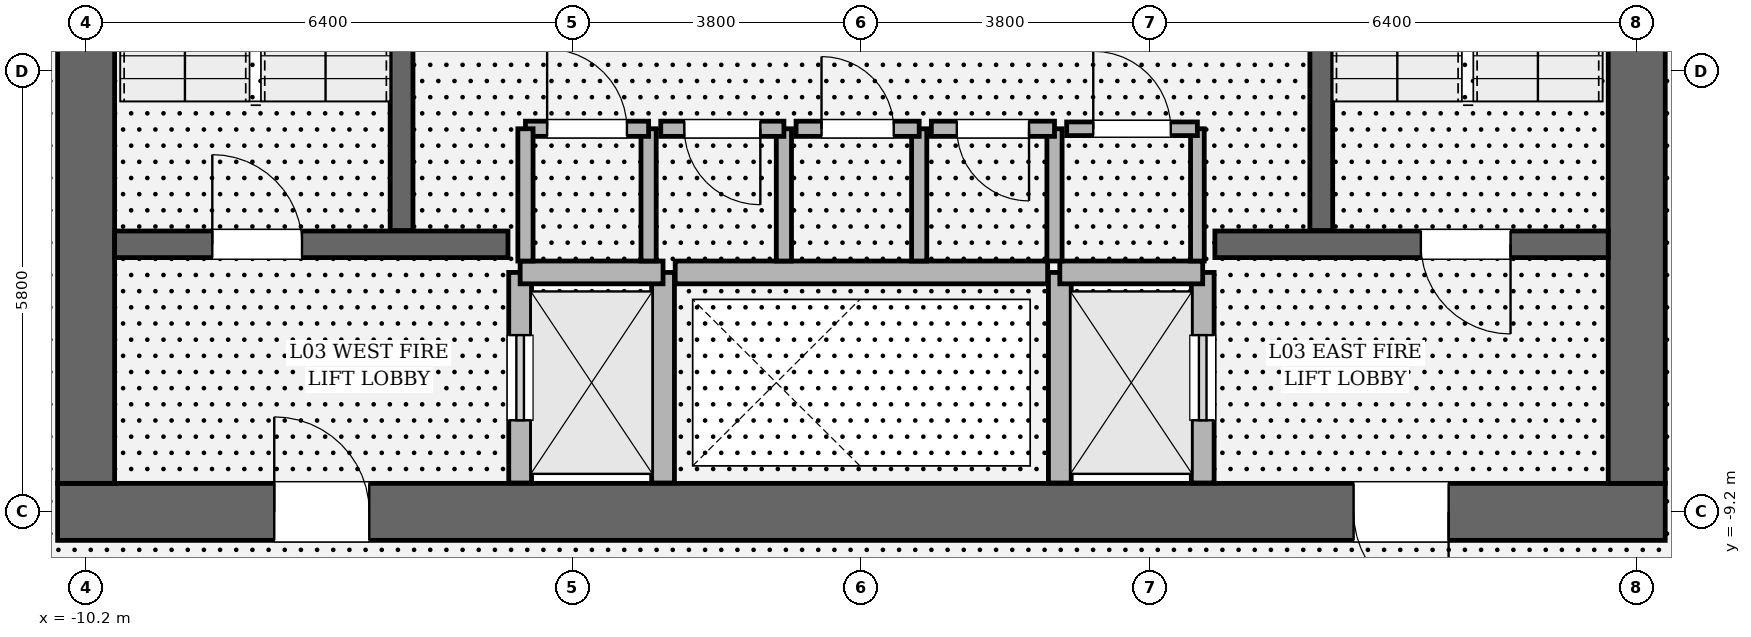
"""IFC4 building model, lengths in metres.
Left out: names, types, materials, properties, quantities, classifications, styles, units other than length and angle.
Written with IfcOpenShell. Run it as: python <this file> out.ifc"""

import sys

from ifc_helpers import new_model, si_unit, direction, frame, frame_2d, origin, place, context, subcontext, project, spatial, rectangle, extrude, element, fill, save


model = new_model("IFC4")
c1 = context("Model", 3, precision=1e-05, world=origin(), true_north=direction((0.0, 1.0)))
c2 = subcontext(c1, "Body", "Model", "MODEL_VIEW")
j1 = project(units=[si_unit("LENGTHUNIT", "METRE"), si_unit("PLANEANGLEUNIT", "RADIAN")], contexts=[c1])
p1 = place(None, origin())
s1 = spatial("IfcSite", under=j1, at=p1, CompositionType="ELEMENT")
p2 = place(p1, origin())
s2 = spatial("IfcBuilding", under=s1, at=p2, CompositionType="ELEMENT")
p3 = place(p2, frame((0.0, 0.0, 16.8)))
s3 = spatial("IfcBuildingStorey", under=s2, at=p3, CompositionType="ELEMENT", Elevation=16.8)
p4 = place(p3, frame((10.575, -9.2, 0.0), z_axis=(0.0, 0.0, 1.0), x_axis=(-1.0, 0.0, 0.0)))
e1 = element("IfcWall", 1, at=p4, inside=s3, PredefinedType="SHEAR", context=c2, shape_type="SweptSolid", body=[
    extrude(rectangle(XDim=21.15, YDim=0.75, at=frame_2d((10.575, 0.0))), origin(), (0.0, 0.0, 1.0), 5.4),
])
p5 = place(p4, frame((2.85, 0.0, 0.0)))
e2 = element("IfcOpeningElement", 2, at=p5, cuts=e1, PredefinedType="OPENING", context=c2, shape_type="SweptSolid", body=[
    extrude(rectangle(XDim=1.25, YDim=2.25, at=frame_2d((0.625, 1.125))), frame((0.0, 0.385, 0.0), z_axis=(0.0, -1.0, 0.0), x_axis=(1.0, 0.0, 0.0)), (0.0, 0.0, 1.0), 0.77),
])
p6 = place(p4, frame((17.05, 0.0, 0.0)))
e3 = element("IfcOpeningElement", 3, at=p6, cuts=e1, PredefinedType="OPENING", context=c2, shape_type="SweptSolid", body=[
    extrude(rectangle(XDim=1.25, YDim=2.25, at=frame_2d((0.625, 1.125))), frame((0.0, 0.385, 0.0), z_axis=(0.0, -1.0, 0.0), x_axis=(1.0, 0.0, 0.0)), (0.0, 0.0, 1.0), 0.77),
])
p7 = place(p3, frame((-10.2, -8.825, 0.0), z_axis=(0.0, 0.0, 1.0), x_axis=(0.0, 1.0, 0.0)))
e4 = element("IfcWall", 4, at=p7, inside=s3, PredefinedType="SHEAR", context=c2, shape_type="SweptSolid", body=[
    extrude(rectangle(XDim=17.65, YDim=0.75, at=frame_2d((8.825, 0.0))), origin(), (0.0, 0.0, 1.0), 5.4),
])
p8 = place(p7, frame((12.615, 0.0, 0.0)))
e5 = element("IfcOpeningElement", 5, at=p8, cuts=e4, PredefinedType="OPENING", context=c2, shape_type="SweptSolid", body=[
    extrude(rectangle(XDim=1.18, YDim=2.2, at=frame_2d((0.59, 1.1))), frame((0.0, 0.385, 0.0), z_axis=(0.0, -1.0, 0.0), x_axis=(1.0, 0.0, 0.0)), (0.0, 0.0, 1.0), 0.77),
])
p9 = place(p3, frame((10.2, 8.825, 0.0), z_axis=(0.0, 0.0, 1.0), x_axis=(0.0, -1.0, 0.0)))
e6 = element("IfcWall", 6, at=p9, inside=s3, PredefinedType="SHEAR", context=c2, shape_type="SweptSolid", body=[
    extrude(rectangle(XDim=17.65, YDim=0.75, at=frame_2d((8.825, 0.0))), origin(), (0.0, 0.0, 1.0), 5.4),
])
p10 = place(p9, frame((3.855, 0.0, 0.0)))
e7 = element("IfcOpeningElement", 7, at=p10, cuts=e6, PredefinedType="OPENING", context=c2, shape_type="SweptSolid", body=[
    extrude(rectangle(XDim=1.18, YDim=2.2, at=frame_2d((0.59, 1.1))), frame((0.0, 0.385, 0.0), z_axis=(0.0, -1.0, 0.0), x_axis=(1.0, 0.0, 0.0)), (0.0, 0.0, 1.0), 0.77),
])
for number, where, z_axis, x_axis in (
    (8, (-6.05, -5.5, 0.0), (0.0, 0.0, 1.0), (0.0, 1.0, 0.0)),
    (9, (6.05, 3.45, 0.0), (0.0, 0.0, 1.0), (0.0, -1.0, 0.0)),
):
    element("IfcWall", number, at=place(p3, frame(where, z_axis=z_axis, x_axis=x_axis)), inside=s3, PredefinedType="SOLIDWALL", context=c2, shape_type="SweptSolid", body=[
        extrude(rectangle(XDim=8.95, YDim=0.3, at=frame_2d((4.475, 0.0))), origin(), (0.0, 0.0, 1.0), 5.4),
    ])
p11 = place(p3, frame((-9.825, -5.68, 0.0), z_axis=(0.0, 0.0, 1.0), x_axis=(1.0, 0.0, 0.0)))
e10 = element("IfcWall", 10, at=p11, inside=s3, PredefinedType="SOLIDWALL", context=c2, shape_type="SweptSolid", body=[
    extrude(rectangle(XDim=5.175, YDim=0.35, at=frame_2d((2.587, 0.0))), origin(), (0.0, 0.0, 1.0), 5.4),
])
p12 = place(p11, frame((1.285, 0.0, 0.0)))
e11 = element("IfcOpeningElement", 11, at=p12, cuts=e10, PredefinedType="OPENING", context=c2, shape_type="SweptSolid", body=[
    extrude(rectangle(XDim=1.18, YDim=2.2, at=frame_2d((0.59, 1.1))), frame((0.0, 0.185, 0.0), z_axis=(0.0, -1.0, 0.0), x_axis=(1.0, 0.0, 0.0)), (0.0, 0.0, 1.0), 0.37),
])
p13 = place(p3, frame((4.65, -5.68, 0.0), z_axis=(0.0, 0.0, 1.0), x_axis=(1.0, 0.0, 0.0)))
e12 = element("IfcWall", 12, at=p13, inside=s3, PredefinedType="SOLIDWALL", context=c2, shape_type="SweptSolid", body=[
    extrude(rectangle(XDim=5.175, YDim=0.35, at=frame_2d((2.587, 0.0))), origin(), (0.0, 0.0, 1.0), 5.4),
])
p14 = place(p13, frame((2.71, 0.0, 0.0)))
e13 = element("IfcOpeningElement", 13, at=p14, cuts=e12, PredefinedType="OPENING", context=c2, shape_type="SweptSolid", body=[
    extrude(rectangle(XDim=1.18, YDim=2.2, at=frame_2d((0.59, 1.1))), frame((0.0, 0.185, 0.0), z_axis=(0.0, -1.0, 0.0), x_axis=(1.0, 0.0, 0.0)), (0.0, 0.0, 1.0), 0.37),
])
p15 = place(p3, frame((-4.49, -8.82, 0.0), z_axis=(0.0, 0.0, 1.0), x_axis=(0.0, 1.0, 0.0)))
e14 = element("IfcWall", 14, at=p15, inside=s3, PredefinedType="SOLIDWALL", context=c2, shape_type="SweptSolid", body=[
    extrude(rectangle(XDim=2.77, YDim=0.3, at=frame_2d((1.385, 0.0))), origin(), (0.0, 0.0, 1.0), 5.02),
])
p16 = place(p15, frame((0.825, 0.0, 0.0)))
e15 = element("IfcOpeningElement", 15, at=p16, cuts=e14, PredefinedType="OPENING", context=c2, shape_type="SweptSolid", body=[
    extrude(rectangle(XDim=1.12, YDim=2.25, at=frame_2d((0.56, 1.125))), frame((0.0, 0.16, 0.0), z_axis=(0.0, -1.0, 0.0), x_axis=(1.0, 0.0, 0.0)), (0.0, 0.0, 1.0), 0.32),
])
p17 = place(p3, frame((-2.61, -8.82, 0.0), z_axis=(0.0, 0.0, 1.0), x_axis=(0.0, 1.0, 0.0)))
e16 = element("IfcWall", 16, at=p17, inside=s3, PredefinedType="SOLIDWALL", context=c2, shape_type="SweptSolid", body=[
    extrude(rectangle(XDim=2.77, YDim=0.3, at=frame_2d((1.385, 0.0))), origin(), (0.0, 0.0, 1.0), 5.02),
])
p18 = place(p3, frame((-4.49, -6.05, 0.0), z_axis=(0.0, 0.0, 1.0), x_axis=(1.0, 0.0, 0.0)))
e17 = element("IfcWall", 17, at=p18, inside=s3, PredefinedType="SOLIDWALL", context=c2, shape_type="SweptSolid", body=[
    extrude(rectangle(XDim=1.88, YDim=0.3, at=frame_2d((0.94, 0.0))), origin(), (0.0, 0.0, 1.0), 5.02),
])
p19 = place(p3, frame((4.49, -8.82, 0.0), z_axis=(0.0, 0.0, 1.0), x_axis=(0.0, 1.0, 0.0)))
e18 = element("IfcWall", 18, at=p19, inside=s3, PredefinedType="SOLIDWALL", context=c2, shape_type="SweptSolid", body=[
    extrude(rectangle(XDim=2.77, YDim=0.3, at=frame_2d((1.385, 0.0))), origin(), (0.0, 0.0, 1.0), 5.02),
])
p20 = place(p19, frame((0.825, 0.0, 0.0)))
e19 = element("IfcOpeningElement", 19, at=p20, cuts=e18, PredefinedType="OPENING", context=c2, shape_type="SweptSolid", body=[
    extrude(rectangle(XDim=1.12, YDim=2.25, at=frame_2d((0.56, 1.125))), frame((0.0, 0.16, 0.0), z_axis=(0.0, -1.0, 0.0), x_axis=(1.0, 0.0, 0.0)), (0.0, 0.0, 1.0), 0.32),
])
p21 = place(p3, frame((2.61, -8.82, 0.0), z_axis=(0.0, 0.0, 1.0), x_axis=(0.0, 1.0, 0.0)))
e20 = element("IfcWall", 20, at=p21, inside=s3, PredefinedType="SOLIDWALL", context=c2, shape_type="SweptSolid", body=[
    extrude(rectangle(XDim=2.77, YDim=0.3, at=frame_2d((1.385, 0.0))), origin(), (0.0, 0.0, 1.0), 5.02),
])
p22 = place(p3, frame((2.61, -6.05, 0.0), z_axis=(0.0, 0.0, 1.0), x_axis=(1.0, 0.0, 0.0)))
e21 = element("IfcWall", 21, at=p22, inside=s3, PredefinedType="SOLIDWALL", context=c2, shape_type="SweptSolid", body=[
    extrude(rectangle(XDim=1.88, YDim=0.3, at=frame_2d((0.94, 0.0))), origin(), (0.0, 0.0, 1.0), 5.02),
])
p23 = place(p3, frame((-2.45, -6.05, 0.0), z_axis=(0.0, 0.0, 1.0), x_axis=(1.0, 0.0, 0.0)))
e22 = element("IfcWall", 22, at=p23, inside=s3, PredefinedType="SOLIDWALL", context=c2, shape_type="SweptSolid", body=[
    extrude(rectangle(XDim=4.9, YDim=0.3, at=frame_2d((2.45, 0.0))), origin(), (0.0, 0.0, 1.0), 5.02),
])
p24 = place(p3, frame((-2.8, -5.9, 0.0), z_axis=(0.0, 0.0, 1.0), x_axis=(0.0, 1.0, 0.0)))
e23 = element("IfcWall", 23, at=p24, inside=s3, PredefinedType="SOLIDWALL", context=c2, shape_type="SweptSolid", body=[
    extrude(rectangle(XDim=1.74, YDim=0.2, at=frame_2d((0.87, 0.0))), origin(), (0.0, 0.0, 1.0), 5.02),
])
p25 = place(p3, frame((-2.8, -4.16, 0.0), z_axis=(0.0, 0.0, 1.0), x_axis=(-1.0, 0.0, 0.0)))
e24 = element("IfcWall", 24, at=p25, inside=s3, PredefinedType="SOLIDWALL", context=c2, shape_type="SweptSolid", body=[
    extrude(rectangle(XDim=1.62, YDim=0.2, at=frame_2d((0.81, 0.0))), origin(), (0.0, 0.0, 1.0), 5.02),
])
p26 = place(p25, frame((0.285, 0.0, 0.0)))
e25 = element("IfcOpeningElement", 25, at=p26, cuts=e24, PredefinedType="OPENING", context=c2, shape_type="SweptSolid", body=[
    extrude(rectangle(XDim=1.05, YDim=2.2, at=frame_2d((0.525, 1.1))), frame((0.0, 0.11, 0.0), z_axis=(0.0, -1.0, 0.0), x_axis=(1.0, 0.0, 0.0)), (0.0, 0.0, 1.0), 0.22),
])
for number, where, z_axis, x_axis in (
    (26, (-4.42, -4.16, 0.0), (0.0, 0.0, 1.0), (0.0, -1.0, 0.0)),
    (27, (-1.02, -5.9, 0.0), (0.0, 0.0, 1.0), (0.0, 1.0, 0.0)),
):
    element("IfcWall", number, at=place(p3, frame(where, z_axis=z_axis, x_axis=x_axis)), inside=s3, PredefinedType="SOLIDWALL", context=c2, shape_type="SweptSolid", body=[
        extrude(rectangle(XDim=1.74, YDim=0.2, at=frame_2d((0.87, 0.0))), origin(), (0.0, 0.0, 1.0), 5.02),
    ])
p27 = place(p3, frame((-1.02, -4.16, 0.0), z_axis=(0.0, 0.0, 1.0), x_axis=(-1.0, 0.0, 0.0)))
e28 = element("IfcWall", 28, at=p27, inside=s3, PredefinedType="SOLIDWALL", context=c2, shape_type="SweptSolid", body=[
    extrude(rectangle(XDim=1.62, YDim=0.2, at=frame_2d((0.81, 0.0))), origin(), (0.0, 0.0, 1.0), 5.02),
])
p28 = place(p27, frame((0.31, 0.0, 0.0)))
e29 = element("IfcOpeningElement", 29, at=p28, cuts=e28, PredefinedType="OPENING", context=c2, shape_type="SweptSolid", body=[
    extrude(rectangle(XDim=1.0, YDim=2.15, at=frame_2d((0.5, 1.075))), frame((0.0, 0.11, 0.0), z_axis=(0.0, -1.0, 0.0), x_axis=(1.0, 0.0, 0.0)), (0.0, 0.0, 1.0), 0.22),
])
p29 = place(p3, frame((0.76, -5.9, 0.0), z_axis=(0.0, 0.0, 1.0), x_axis=(0.0, 1.0, 0.0)))
e30 = element("IfcWall", 30, at=p29, inside=s3, PredefinedType="SOLIDWALL", context=c2, shape_type="SweptSolid", body=[
    extrude(rectangle(XDim=1.74, YDim=0.2, at=frame_2d((0.87, 0.0))), origin(), (0.0, 0.0, 1.0), 5.02),
])
p30 = place(p3, frame((0.76, -4.16, 0.0), z_axis=(0.0, 0.0, 1.0), x_axis=(-1.0, 0.0, 0.0)))
e31 = element("IfcWall", 31, at=p30, inside=s3, PredefinedType="SOLIDWALL", context=c2, shape_type="SweptSolid", body=[
    extrude(rectangle(XDim=1.62, YDim=0.2, at=frame_2d((0.81, 0.0))), origin(), (0.0, 0.0, 1.0), 5.02),
])
p31 = place(p30, frame((0.335, 0.0, 0.0)))
e32 = element("IfcOpeningElement", 32, at=p31, cuts=e31, PredefinedType="OPENING", context=c2, shape_type="SweptSolid", body=[
    extrude(rectangle(XDim=0.95, YDim=2.15, at=frame_2d((0.475, 1.075))), frame((0.0, 0.11, 0.0), z_axis=(0.0, -1.0, 0.0), x_axis=(1.0, 0.0, 0.0)), (0.0, 0.0, 1.0), 0.22),
])
p32 = place(p3, frame((2.54, -5.9, 0.0), z_axis=(0.0, 0.0, 1.0), x_axis=(0.0, 1.0, 0.0)))
e33 = element("IfcWall", 33, at=p32, inside=s3, PredefinedType="SOLIDWALL", context=c2, shape_type="SweptSolid", body=[
    extrude(rectangle(XDim=1.74, YDim=0.2, at=frame_2d((0.87, 0.0))), origin(), (0.0, 0.0, 1.0), 5.02),
])
p33 = place(p3, frame((2.54, -4.16, 0.0), z_axis=(0.0, 0.0, 1.0), x_axis=(-1.0, 0.0, 0.0)))
e34 = element("IfcWall", 34, at=p33, inside=s3, PredefinedType="SOLIDWALL", context=c2, shape_type="SweptSolid", body=[
    extrude(rectangle(XDim=1.62, YDim=0.2, at=frame_2d((0.81, 0.0))), origin(), (0.0, 0.0, 1.0), 5.02),
])
p34 = place(p33, frame((0.335, 0.0, 0.0)))
e35 = element("IfcOpeningElement", 35, at=p34, cuts=e34, PredefinedType="OPENING", context=c2, shape_type="SweptSolid", body=[
    extrude(rectangle(XDim=0.95, YDim=2.15, at=frame_2d((0.475, 1.075))), frame((0.0, 0.11, 0.0), z_axis=(0.0, -1.0, 0.0), x_axis=(1.0, 0.0, 0.0)), (0.0, 0.0, 1.0), 0.22),
])
p35 = place(p3, frame((4.42, -5.9, 0.0), z_axis=(0.0, 0.0, 1.0), x_axis=(0.0, 1.0, 0.0)))
e36 = element("IfcWall", 36, at=p35, inside=s3, PredefinedType="PARTITIONING", context=c2, shape_type="SweptSolid", body=[
    extrude(rectangle(XDim=1.74, YDim=0.18, at=frame_2d((0.87, 0.0))), origin(), (0.0, 0.0, 1.0), 5.02),
])
p36 = place(p3, frame((4.42, -4.16, 0.0), z_axis=(0.0, 0.0, 1.0), x_axis=(-1.0, 0.0, 0.0)))
e37 = element("IfcWall", 37, at=p36, inside=s3, PredefinedType="PARTITIONING", context=c2, shape_type="SweptSolid", body=[
    extrude(rectangle(XDim=1.72, YDim=0.18, at=frame_2d((0.86, 0.0))), origin(), (0.0, 0.0, 1.0), 5.02),
])
p37 = place(p36, frame((0.35, 0.0, 0.0)))
e38 = element("IfcOpeningElement", 38, at=p37, cuts=e37, PredefinedType="OPENING", context=c2, shape_type="SweptSolid", body=[
    extrude(rectangle(XDim=1.02, YDim=2.2, at=frame_2d((0.51, 1.1))), frame((0.0, 0.1, 0.0), z_axis=(0.0, -1.0, 0.0), x_axis=(1.0, 0.0, 0.0)), (0.0, 0.0, 1.0), 0.2),
])
p38 = place(p12, origin())
e39 = element("IfcDoor", 39, at=p38, inside=s3, OperationType="SINGLE_SWING_LEFT", PredefinedType="DOOR", context=c2, shape_type="SweptSolid", body=[
    extrude(rectangle(XDim=1.18, YDim=2.2, at=frame_2d((0.59, 1.1))), frame((0.0, 0.025, 0.0), z_axis=(0.0, -1.0, 0.0), x_axis=(1.0, 0.0, 0.0)), (0.0, 0.0, 1.0), 0.05),
])
fill(e11, e39)
p39 = place(p14, origin())
e40 = element("IfcDoor", 40, at=p39, inside=s3, OperationType="SINGLE_SWING_RIGHT", PredefinedType="DOOR", context=c2, shape_type="SweptSolid", body=[
    extrude(rectangle(XDim=1.18, YDim=2.2, at=frame_2d((0.59, 1.1))), frame((0.0, 0.025, 0.0), z_axis=(0.0, -1.0, 0.0), x_axis=(1.0, 0.0, 0.0)), (0.0, 0.0, 1.0), 0.05),
])
fill(e13, e40)
p40 = place(p5, origin())
e41 = element("IfcDoor", 41, at=p40, inside=s3, OperationType="SINGLE_SWING_LEFT", PredefinedType="DOOR", context=c2, shape_type="SweptSolid", body=[
    extrude(rectangle(XDim=1.25, YDim=2.25, at=frame_2d((0.625, 1.125))), frame((0.0, 0.025, 0.0), z_axis=(0.0, -1.0, 0.0), x_axis=(1.0, 0.0, 0.0)), (0.0, 0.0, 1.0), 0.05),
])
fill(e2, e41)
p41 = place(p6, origin())
e42 = element("IfcDoor", 42, at=p41, inside=s3, OperationType="SINGLE_SWING_RIGHT", PredefinedType="DOOR", context=c2, shape_type="SweptSolid", body=[
    extrude(rectangle(XDim=1.25, YDim=2.25, at=frame_2d((0.625, 1.125))), frame((0.0, 0.025, 0.0), z_axis=(0.0, -1.0, 0.0), x_axis=(1.0, 0.0, 0.0)), (0.0, 0.0, 1.0), 0.05),
])
fill(e3, e42)
p42 = place(p16, origin())
e43 = element("IfcDoor", 43, at=p42, inside=s3, OperationType="SLIDING_TO_LEFT", PredefinedType="DOOR", context=c2, shape_type="SweptSolid", body=[
    extrude(rectangle(XDim=1.12, YDim=2.25, at=frame_2d((0.56, 1.125))), frame((0.0, 0.025, 0.0), z_axis=(0.0, -1.0, 0.0), x_axis=(1.0, 0.0, 0.0)), (0.0, 0.0, 1.0), 0.05),
])
fill(e15, e43)
p43 = place(p20, origin())
e44 = element("IfcDoor", 44, at=p43, inside=s3, OperationType="SLIDING_TO_RIGHT", PredefinedType="DOOR", context=c2, shape_type="SweptSolid", body=[
    extrude(rectangle(XDim=1.12, YDim=2.25, at=frame_2d((0.56, 1.125))), frame((0.0, 0.025, 0.0), z_axis=(0.0, -1.0, 0.0), x_axis=(1.0, 0.0, 0.0)), (0.0, 0.0, 1.0), 0.05),
])
fill(e19, e44)
p44 = place(p26, origin())
e45 = element("IfcDoor", 45, at=p44, inside=s3, OperationType="SINGLE_SWING_RIGHT", PredefinedType="DOOR", context=c2, shape_type="SweptSolid", body=[
    extrude(rectangle(XDim=1.05, YDim=2.2, at=frame_2d((0.525, 1.1))), frame((0.0, 0.025, 0.0), z_axis=(0.0, -1.0, 0.0), x_axis=(1.0, 0.0, 0.0)), (0.0, 0.0, 1.0), 0.05),
])
fill(e25, e45)
p45 = place(p28, origin())
e46 = element("IfcDoor", 46, at=p45, inside=s3, OperationType="SINGLE_SWING_LEFT", PredefinedType="DOOR", context=c2, shape_type="SweptSolid", body=[
    extrude(rectangle(XDim=1.0, YDim=2.15, at=frame_2d((0.5, 1.075))), frame((0.0, 0.025, 0.0), z_axis=(0.0, -1.0, 0.0), x_axis=(1.0, 0.0, 0.0)), (0.0, 0.0, 1.0), 0.05),
])
fill(e29, e46)
p46 = place(p31, origin())
e47 = element("IfcDoor", 47, at=p46, inside=s3, OperationType="SINGLE_SWING_RIGHT", PredefinedType="DOOR", context=c2, shape_type="SweptSolid", body=[
    extrude(rectangle(XDim=0.95, YDim=2.15, at=frame_2d((0.475, 1.075))), frame((0.0, 0.025, 0.0), z_axis=(0.0, -1.0, 0.0), x_axis=(1.0, 0.0, 0.0)), (0.0, 0.0, 1.0), 0.05),
])
fill(e32, e47)
p47 = place(p34, origin())
e48 = element("IfcDoor", 48, at=p47, inside=s3, OperationType="SINGLE_SWING_LEFT", PredefinedType="DOOR", context=c2, shape_type="SweptSolid", body=[
    extrude(rectangle(XDim=0.95, YDim=2.15, at=frame_2d((0.475, 1.075))), frame((0.0, 0.025, 0.0), z_axis=(0.0, -1.0, 0.0), x_axis=(1.0, 0.0, 0.0)), (0.0, 0.0, 1.0), 0.05),
])
fill(e35, e48)
p48 = place(p37, origin())
e49 = element("IfcDoor", 49, at=p48, inside=s3, OperationType="SINGLE_SWING_RIGHT", PredefinedType="DOOR", context=c2, shape_type="SweptSolid", body=[
    extrude(rectangle(XDim=1.02, YDim=2.2, at=frame_2d((0.51, 1.1))), frame((0.0, 0.025, 0.0), z_axis=(0.0, -1.0, 0.0), x_axis=(1.0, 0.0, 0.0)), (0.0, 0.0, 1.0), 0.05),
])
fill(e38, e49)
save(model, sys.argv[1])
